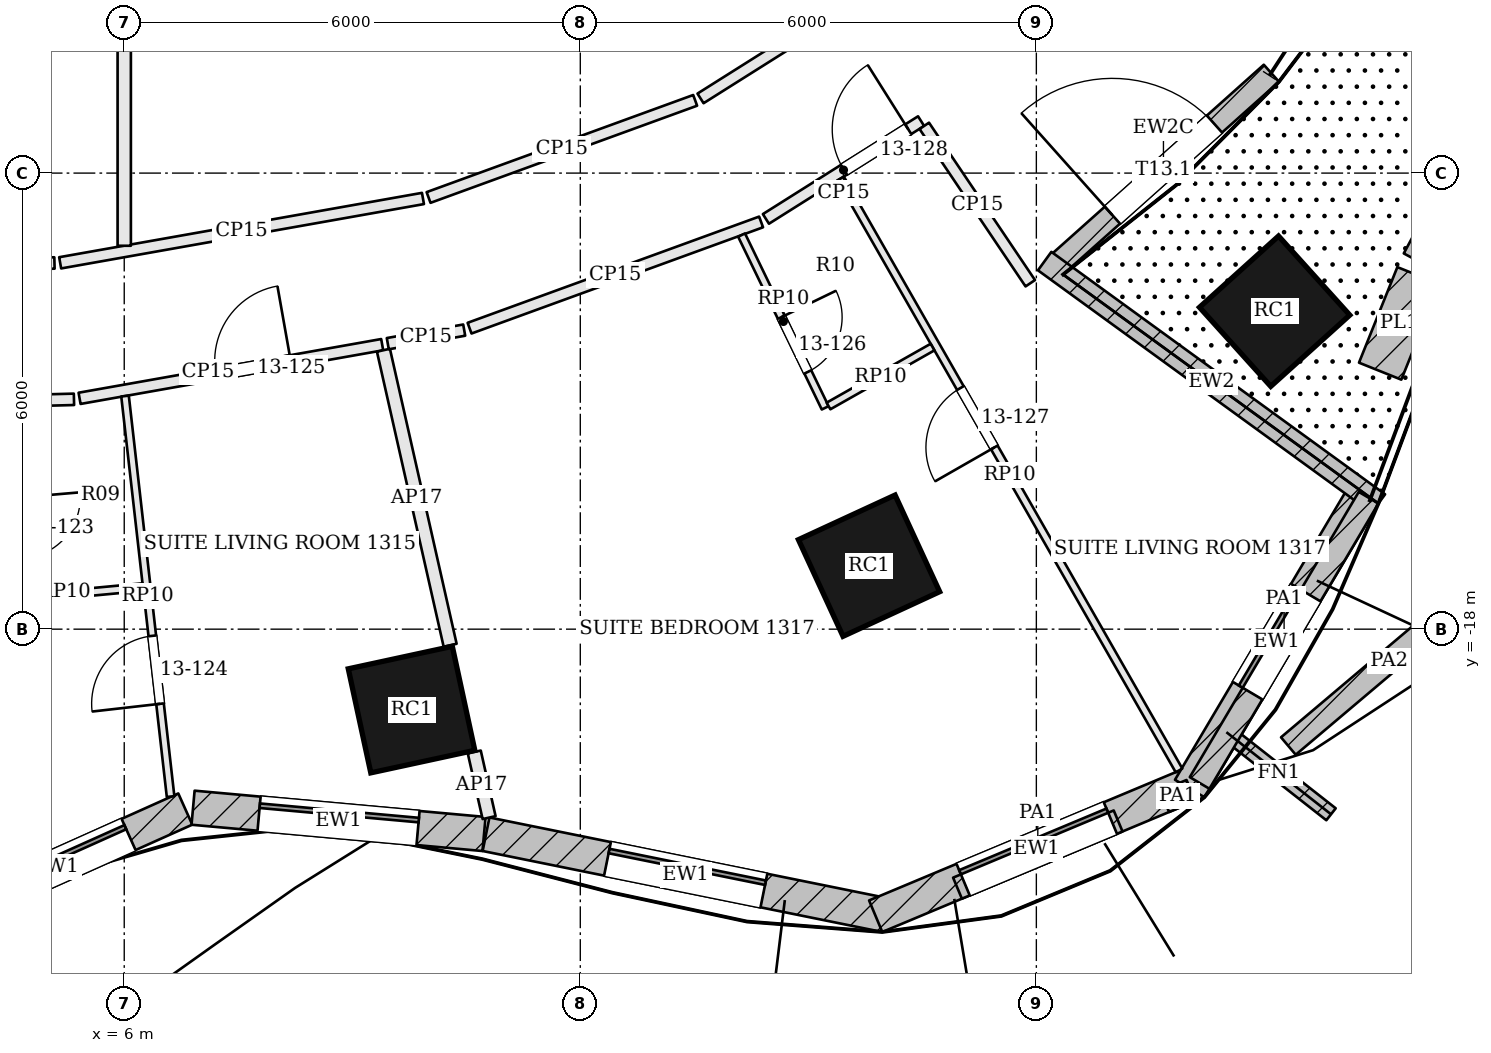
"""IFC4 building model, lengths in metres.
Left out: names, types, materials, properties, quantities, classifications, styles, units other than length and angle.
Written with IfcOpenShell. Run it as: python <this file> out.ifc"""

import sys

from ifc_helpers import new_model, si_unit, direction, frame, frame_2d, origin, origin_2d, place, context, subcontext, project, spatial, rectangle, extrude, element, fill, save


model = new_model("IFC4")
c1 = context("Model", 3, precision=1e-05, world=origin(), true_north=direction((0.0, 1.0)))
c2 = subcontext(c1, "Body", "Model", "MODEL_VIEW")
j1 = project(units=[si_unit("LENGTHUNIT", "METRE"), si_unit("PLANEANGLEUNIT", "RADIAN")], contexts=[c1])
p1 = place(None, origin())
s1 = spatial("IfcSite", under=j1, at=p1, CompositionType="ELEMENT")
p2 = place(p1, origin())
s2 = spatial("IfcBuilding", under=s1, at=p2, CompositionType="ELEMENT")
p3 = place(p2, frame((0.0, 0.0, 62.7)))
s3 = spatial("IfcBuildingStorey", under=s2, at=p3, CompositionType="ELEMENT", Elevation=62.7)
for number, where, z_axis, x_axis in (
    (1, (9.78, -19.058, 0.0), (0.0, 0.0, 1.0), (0.977, 0.211, 0.0)),
    (2, (15.799, -17.165, 0.0), (0.0, 0.0, 1.0), (0.908, 0.419, 0.0)),
    (3, (21.135, -13.817, 0.0), (0.0, 0.0, 1.0), (0.743, 0.67, 0.0)),
):
    element("IfcColumn", number, at=place(p3, frame(where, z_axis=z_axis, x_axis=x_axis)), inside=s3, PredefinedType="COLUMN", context=c2, shape_type="SweptSolid", body=[
        extrude(rectangle(XDim=1.4, YDim=1.4, at=origin_2d()), origin(), (0.0, 0.0, 1.0), 3.6),
    ])
p4 = place(p3, frame((3.395, -21.894, 0.0), z_axis=(0.0, 0.0, 1.0), x_axis=(0.912496703183, 0.409084058208, 0.0)))
e4 = element("IfcWall", 4, at=p4, inside=s3, PredefinedType="SOLIDWALL", context=c2, shape_type="SweptSolid", body=[
    extrude(rectangle(XDim=3.735, YDim=0.45, at=frame_2d((1.867, 0.0))), origin(), (0.0, 0.0, 1.0), 3.4),
])
p5 = place(p4, frame((0.817, 0.0, 0.9)))
e5 = element("IfcOpeningElement", 5, at=p5, cuts=e4, PredefinedType="OPENING", context=c2, shape_type="SweptSolid", body=[
    extrude(rectangle(XDim=2.1, YDim=2.0, at=frame_2d((1.05, 1.0))), frame((0.0, 0.235, 0.0), z_axis=(0.0, -1.0, 0.0), x_axis=(1.0, 0.0, 0.0)), (0.0, 0.0, 1.0), 0.47),
])
p6 = place(p3, frame((6.906, -20.349, 0.0), z_axis=(0.0, 0.0, 1.0), x_axis=(0.995947174038, -0.089940127451, 0.0)))
e6 = element("IfcWall", 6, at=p6, inside=s3, PredefinedType="SOLIDWALL", context=c2, shape_type="SweptSolid", body=[
    extrude(rectangle(XDim=3.844, YDim=0.45, at=frame_2d((1.922, 0.0))), origin(), (0.0, 0.0, 1.0), 3.4),
])
p7 = place(p6, frame((0.872, 0.0, 0.9)))
e7 = element("IfcOpeningElement", 7, at=p7, cuts=e6, PredefinedType="OPENING", context=c2, shape_type="SweptSolid", body=[
    extrude(rectangle(XDim=2.1, YDim=2.0, at=frame_2d((1.05, 1.0))), frame((0.0, 0.235, 0.0), z_axis=(0.0, -1.0, 0.0), x_axis=(1.0, 0.0, 0.0)), (0.0, 0.0, 1.0), 0.47),
])
p8 = place(p3, frame((10.76, -20.698, 0.0), z_axis=(0.0, 0.0, 1.0), x_axis=(0.980072890434, -0.198638187256, 0.0)))
e8 = element("IfcWall", 8, at=p8, inside=s3, PredefinedType="SOLIDWALL", context=c2, shape_type="SweptSolid", body=[
    extrude(rectangle(XDim=5.36, YDim=0.45, at=frame_2d((2.68, 0.0))), origin(), (0.0, 0.0, 1.0), 3.4),
])
p9 = place(p8, frame((1.63, 0.0, 0.9)))
e9 = element("IfcOpeningElement", 9, at=p9, cuts=e8, PredefinedType="OPENING", context=c2, shape_type="SweptSolid", body=[
    extrude(rectangle(XDim=2.1, YDim=2.0, at=frame_2d((1.05, 1.0))), frame((0.0, 0.235, 0.0), z_axis=(0.0, -1.0, 0.0), x_axis=(1.0, 0.0, 0.0)), (0.0, 0.0, 1.0), 0.47),
])
p10 = place(p3, frame((15.886, -21.776, 0.0), z_axis=(0.0, 0.0, 1.0), x_axis=(0.922527247898, 0.385931958882, 0.0)))
e10 = element("IfcWall", 10, at=p10, inside=s3, PredefinedType="SOLIDWALL", context=c2, shape_type="SweptSolid", body=[
    extrude(rectangle(XDim=4.594, YDim=0.45, at=frame_2d((2.297, 0.0))), origin(), (0.0, 0.0, 1.0), 3.4),
])
p11 = place(p10, frame((1.247, 0.0, 0.9)))
e11 = element("IfcOpeningElement", 11, at=p11, cuts=e10, PredefinedType="OPENING", context=c2, shape_type="SweptSolid", body=[
    extrude(rectangle(XDim=2.1, YDim=2.0, at=frame_2d((1.05, 1.0))), frame((0.0, 0.235, 0.0), z_axis=(0.0, -1.0, 0.0), x_axis=(1.0, 0.0, 0.0)), (0.0, 0.0, 1.0), 0.47),
])
p12 = place(p3, frame((20.017, -20.096, 0.0), z_axis=(0.0, 0.0, 1.0), x_axis=(0.509707017446, 0.860348043739, 0.0)))
e12 = element("IfcWall", 12, at=p12, inside=s3, PredefinedType="SOLIDWALL", context=c2, shape_type="SweptSolid", body=[
    extrude(rectangle(XDim=4.491, YDim=0.45, at=frame_2d((2.246, 0.0))), origin(), (0.0, 0.0, 1.0), 3.4),
])
p13 = place(p12, frame((1.496, 0.0, 0.9)))
e13 = element("IfcOpeningElement", 13, at=p13, cuts=e12, PredefinedType="OPENING", context=c2, shape_type="SweptSolid", body=[
    extrude(rectangle(XDim=1.5, YDim=2.0, at=frame_2d((0.75, 1.0))), frame((0.0, 0.235, 0.0), z_axis=(0.0, -1.0, 0.0), x_axis=(1.0, 0.0, 0.0)), (0.0, 0.0, 1.0), 0.47),
])
p14 = place(p3, frame((18.252, -13.222, 0.0), z_axis=(0.0, 0.0, 1.0), x_axis=(0.745864843194, 0.666097316979, 0.0)))
e14 = element("IfcWall", 14, at=p14, inside=s3, PredefinedType="SOLIDWALL", context=c2, shape_type="SweptSolid", body=[
    extrude(rectangle(XDim=3.807, YDim=0.3, at=frame_2d((1.904, 0.0))), origin(), (0.0, 0.0, 1.0), 2.804),
])
p15 = place(p14, frame((1.004, 0.0, 0.0)))
e15 = element("IfcOpeningElement", 15, at=p15, cuts=e14, PredefinedType="OPENING", context=c2, shape_type="SweptSolid", body=[
    extrude(rectangle(XDim=1.8, YDim=2.4, at=frame_2d((0.9, 1.2))), frame((0.0, 0.16, 0.0), z_axis=(0.0, -1.0, 0.0), x_axis=(1.0, 0.0, 0.0)), (0.0, 0.0, 1.0), 0.32),
])
p16 = place(p3, frame((20.5, -19.355, 0.0), z_axis=(0.0, 0.0, 1.0), x_axis=(0.786700632228, -0.617334686577, 0.0)))
e16 = element("IfcWall", 16, at=p16, inside=s3, PredefinedType="SOLIDWALL", context=c2, shape_type="SweptSolid", body=[
    extrude(rectangle(XDim=1.75, YDim=0.2, at=frame_2d((0.875, 0.0))), origin(), (0.0, 0.0, 1.0), 3.4),
])
p17 = place(p3, frame((22.5, -16.347, 0.0), z_axis=(0.0, 0.0, 1.0), x_axis=(-0.809084182594, 0.587692764526, 0.0)))
e17 = element("IfcWall", 17, at=p17, inside=s3, PredefinedType="SOLIDWALL", context=c2, shape_type="SweptSolid", body=[
    extrude(rectangle(XDim=5.427, YDim=0.3, at=frame_2d((2.713, 0.0))), origin(), (0.0, 0.0, 1.0), 2.954),
])
p18 = place(p3, frame((22.523, -14.606, 0.0), z_axis=(0.0, 0.0, 1.0), x_axis=(0.372540149329, 0.928016075905, 0.0)))
e18 = element("IfcWall", 18, at=p18, inside=s3, PredefinedType="SOLIDWALL", context=c2, shape_type="SweptSolid", body=[
    extrude(rectangle(XDim=1.354, YDim=0.6, at=frame_2d((0.677, 0.0))), origin(), (0.0, 0.0, 1.0), 0.6),
])
p19 = place(p3, frame((23.098, -13.199, 0.0), z_axis=(0.0, 0.0, 1.0), x_axis=(0.473381874387, 0.880857310239, 0.0)))
e19 = element("IfcWall", 19, at=p19, inside=s3, PredefinedType="SOLIDWALL", context=c2, shape_type="SweptSolid", body=[
    extrude(rectangle(XDim=1.237, YDim=0.6, at=frame_2d((0.619, 0.0))), origin(), (0.0, 0.0, 1.0), 0.6),
])
p20 = place(p3, frame((23.97, -17.294, 0.0), z_axis=(0.0, 0.0, 1.0), x_axis=(-0.763769796421, -0.645488728077, 0.0)))
e20 = element("IfcWall", 20, at=p20, inside=s3, PredefinedType="PARAPET", context=c2, shape_type="SweptSolid", body=[
    extrude(rectangle(XDim=3.476, YDim=0.3, at=frame_2d((1.738, 0.0))), origin(), (0.0, 0.0, 1.0), 1.1),
])
p21 = place(p3, frame((16.962, -21.407, 3.6), z_axis=(0.0, 0.0, 1.0), x_axis=(0.922533659014, 0.385916633467, 0.0)))
e21 = element("IfcWall", 21, at=p21, inside=s3, PredefinedType="PARAPET", context=c2, shape_type="SweptSolid", body=[
    extrude(rectangle(XDim=2.291, YDim=0.3, at=frame_2d((1.146, 0.0))), origin(), (0.0, 0.0, 1.0), 1.1),
])
p22 = place(p3, frame((19.688, -20.267, 3.6), z_axis=(0.0, 0.0, 1.0), x_axis=(0.922419372029, 0.386189722943, 0.0)))
e22 = element("IfcWall", 22, at=p22, inside=s3, PredefinedType="PARAPET", context=c2, shape_type="SweptSolid", body=[
    extrude(rectangle(XDim=0.374, YDim=0.3, at=frame_2d((0.187, 0.0))), origin(), (0.0, 0.0, 1.0), 1.1),
])
p23 = place(p3, frame((20.148, -20.023, 3.6), z_axis=(0.0, 0.0, 1.0), x_axis=(0.509647415189, 0.86038335188, 0.0)))
e23 = element("IfcWall", 23, at=p23, inside=s3, PredefinedType="PARAPET", context=c2, shape_type="SweptSolid", body=[
    extrude(rectangle(XDim=4.362, YDim=0.3, at=frame_2d((2.181, 0.0))), origin(), (0.0, 0.0, 1.0), 1.1),
])
p24 = place(p3, frame((-0.089, -15.117, 0.0), z_axis=(0.0, 0.0, 1.0), x_axis=(0.999662208654, 0.025989778545, 0.0)))
e24 = element("IfcWall", 24, at=p24, inside=s3, PredefinedType="PARTITIONING", context=c2, shape_type="SweptSolid", body=[
    extrude(rectangle(XDim=5.43, YDim=0.15, at=frame_2d((2.715, 0.0))), origin(), (0.0, 0.0, 1.0), 2.68),
])
p25 = place(p3, frame((5.413, -14.963, 0.0), z_axis=(0.0, 0.0, 1.0), x_axis=(0.984633650787, 0.17463268233, 0.0)))
e25 = element("IfcWall", 25, at=p25, inside=s3, PredefinedType="PARTITIONING", context=c2, shape_type="SweptSolid", body=[
    extrude(rectangle(XDim=4.043, YDim=0.15, at=frame_2d((2.021, 0.0))), origin(), (0.0, 0.0, 1.0), 2.68),
])
p26 = place(p25, frame((1.821, 0.0, 0.0)))
e26 = element("IfcOpeningElement", 26, at=p26, cuts=e25, PredefinedType="OPENING", context=c2, shape_type="SweptSolid", body=[
    extrude(rectangle(XDim=1.0, YDim=2.1, at=frame_2d((0.5, 1.05))), frame((0.0, 0.085, 0.0), z_axis=(0.0, -1.0, 0.0), x_axis=(1.0, 0.0, 0.0)), (0.0, 0.0, 1.0), 0.17),
])
p27 = place(p3, frame((10.8, -20.479, 0.0), z_axis=(0.0, 0.0, 1.0), x_axis=(-0.220523472725, 0.97538166785, 0.0)))
e27 = element("IfcWall", 27, at=p27, inside=s3, PredefinedType="PARTITIONING", context=c2, shape_type="SweptSolid", body=[
    extrude(rectangle(XDim=0.885, YDim=0.175, at=frame_2d((0.442, 0.0))), origin(), (0.0, 0.0, 1.0), 2.68),
])
p28 = place(p3, frame((10.288, -18.211, 0.0), z_axis=(0.0, 0.0, 1.0), x_axis=(-0.220515098372, 0.975383561164, 0.0)))
e28 = element("IfcWall", 28, at=p28, inside=s3, PredefinedType="PARTITIONING", context=c2, shape_type="SweptSolid", body=[
    extrude(rectangle(XDim=3.979, YDim=0.175, at=frame_2d((1.99, 0.0))), origin(), (0.0, 0.0, 1.0), 2.68),
])
p29 = place(p3, frame((9.467, -14.244, 0.0), z_axis=(0.0, 0.0, 1.0), x_axis=(0.98464846319, 0.174549144762, 0.0)))
e29 = element("IfcWall", 29, at=p29, inside=s3, PredefinedType="PARTITIONING", context=c2, shape_type="SweptSolid", body=[
    extrude(rectangle(XDim=1.021, YDim=0.15, at=frame_2d((0.51, 0.0))), origin(), (0.0, 0.0, 1.0), 2.68),
])
p30 = place(p3, frame((10.543, -14.04, 0.0), z_axis=(0.0, 0.0, 1.0), x_axis=(0.939576705301, 0.342338450741, 0.0)))
e30 = element("IfcWall", 30, at=p30, inside=s3, PredefinedType="PARTITIONING", context=c2, shape_type="SweptSolid", body=[
    extrude(rectangle(XDim=4.082, YDim=0.15, at=frame_2d((2.041, 0.0))), origin(), (0.0, 0.0, 1.0), 2.68),
])
p31 = place(p3, frame((14.442, -12.603, 0.0), z_axis=(0.0, 0.0, 1.0), x_axis=(0.846002986925, 0.533178156074, 0.0)))
e31 = element("IfcWall", 31, at=p31, inside=s3, PredefinedType="PARTITIONING", context=c2, shape_type="SweptSolid", body=[
    extrude(rectangle(XDim=2.413, YDim=0.15, at=frame_2d((1.207, 0.0))), origin(), (0.0, 0.0, 1.0), 2.68),
])
p32 = place(p31, frame((1.213, 0.0, 0.0)))
e32 = element("IfcOpeningElement", 32, at=p32, cuts=e31, PredefinedType="OPENING", context=c2, shape_type="SweptSolid", body=[
    extrude(rectangle(XDim=1.0, YDim=2.1, at=frame_2d((0.5, 1.05))), frame((0.0, 0.085, 0.0), z_axis=(0.0, -1.0, 0.0), x_axis=(1.0, 0.0, 0.0)), (0.0, 0.0, 1.0), 0.17),
])
p33 = place(p3, frame((17.92, -13.449, 0.0), z_axis=(0.0, 0.0, 1.0), x_axis=(-0.558575665577, 0.829453570627, 0.0)))
e33 = element("IfcWall", 33, at=p33, inside=s3, PredefinedType="PARTITIONING", context=c2, shape_type="SweptSolid", body=[
    extrude(rectangle(XDim=2.497, YDim=0.15, at=frame_2d((1.248, 0.0))), origin(), (0.0, 0.0, 1.0), 2.68),
])
p34 = place(p3, frame((16.517, -9.167, 0.0), z_axis=(0.0, 0.0, 1.0), x_axis=(-0.846000117603, -0.533182708849, 0.0)))
e34 = element("IfcWall", 34, at=p34, inside=s3, PredefinedType="PARTITIONING", context=c2, shape_type="SweptSolid", body=[
    extrude(rectangle(XDim=3.47, YDim=0.15, at=frame_2d((1.735, 0.0))), origin(), (0.0, 0.0, 1.0), 2.68),
])
p35 = place(p3, frame((13.511, -11.043, 0.0), z_axis=(0.0, 0.0, 1.0), x_axis=(-0.939583191704, -0.342320647736, 0.0)))
e35 = element("IfcWall", 35, at=p35, inside=s3, PredefinedType="PARTITIONING", context=c2, shape_type="SweptSolid", body=[
    extrude(rectangle(XDim=3.733, YDim=0.15, at=frame_2d((1.866, 0.0))), origin(), (0.0, 0.0, 1.0), 2.68),
])
p36 = place(p3, frame((9.93, -12.334, 0.0), z_axis=(0.0, 0.0, 1.0), x_axis=(-0.984638212434, -0.174606960386, 0.0)))
e36 = element("IfcWall", 36, at=p36, inside=s3, PredefinedType="PARTITIONING", context=c2, shape_type="SweptSolid", body=[
    extrude(rectangle(XDim=4.848, YDim=0.15, at=frame_2d((2.424, 0.0))), origin(), (0.0, 0.0, 1.0), 2.68),
])
p37 = place(p3, frame((5.082, -13.182, 0.0), z_axis=(0.0, 0.0, 1.0), x_axis=(-0.999661624383, -0.026012242045, 0.0)))
e37 = element("IfcWall", 37, at=p37, inside=s3, PredefinedType="PARTITIONING", context=c2, shape_type="SweptSolid", body=[
    extrude(rectangle(XDim=7.218, YDim=0.15, at=frame_2d((3.609, 0.0))), origin(), (0.0, 0.0, 1.0), 2.68),
])
p38 = place(p3, frame((6.61, -20.202, 0.0), z_axis=(0.0, 0.0, 1.0), x_axis=(-0.113018145239, 0.993592924113, 0.0)))
e38 = element("IfcWall", 38, at=p38, inside=s3, PredefinedType="PARTITIONING", context=c2, shape_type="SweptSolid", body=[
    extrude(rectangle(XDim=5.303, YDim=0.1, at=frame_2d((2.652, 0.0))), origin(), (0.0, 0.0, 1.0), 2.68),
])
p39 = place(p38, frame((1.228, 0.0, 0.0)))
e39 = element("IfcOpeningElement", 39, at=p39, cuts=e38, PredefinedType="OPENING", context=c2, shape_type="SweptSolid", body=[
    extrude(rectangle(XDim=0.9, YDim=2.4, at=frame_2d((0.45, 1.2))), frame((0.0, 0.06, 0.0), z_axis=(0.0, -1.0, 0.0), x_axis=(1.0, 0.0, 0.0)), (0.0, 0.0, 1.0), 0.12),
])
p40 = place(p3, frame((4.784, -17.583, 0.0), z_axis=(0.0, 0.0, 1.0), x_axis=(0.995655447425, 0.093114069899, 0.0)))
e40 = element("IfcWall", 40, at=p40, inside=s3, PredefinedType="PARTITIONING", context=c2, shape_type="SweptSolid", body=[
    extrude(rectangle(XDim=1.468, YDim=0.1, at=frame_2d((0.734, 0.0))), origin(), (0.0, 0.0, 1.0), 2.68),
])
p41 = place(p3, frame((19.877, -19.859, 0.0), z_axis=(0.0, 0.0, 1.0), x_axis=(-0.496434961101, 0.868073919316, 0.0)))
e41 = element("IfcWall", 41, at=p41, inside=s3, PredefinedType="PARTITIONING", context=c2, shape_type="SweptSolid", body=[
    extrude(rectangle(XDim=8.97, YDim=0.1, at=frame_2d((4.485, 0.0))), origin(), (0.0, 0.0, 1.0), 2.68),
])
p42 = place(p41, frame((4.895, 0.0, 0.0)))
e42 = element("IfcOpeningElement", 42, at=p42, cuts=e41, PredefinedType="OPENING", context=c2, shape_type="SweptSolid", body=[
    extrude(rectangle(XDim=0.9, YDim=2.4, at=frame_2d((0.45, 1.2))), frame((0.0, 0.06, 0.0), z_axis=(0.0, -1.0, 0.0), x_axis=(1.0, 0.0, 0.0)), (0.0, 0.0, 1.0), 0.12),
])
p43 = place(p3, frame((14.122, -12.816, 0.0), z_axis=(0.0, 0.0, 1.0), x_axis=(0.435611476295, -0.900134790862, 0.0)))
e43 = element("IfcWall", 43, at=p43, inside=s3, PredefinedType="PARTITIONING", context=c2, shape_type="SweptSolid", body=[
    extrude(rectangle(XDim=2.525, YDim=0.1, at=frame_2d((1.262, 0.0))), origin(), (0.0, 0.0, 1.0), 2.68),
])
p44 = place(p43, frame((1.2, 0.0, 0.0)))
e44 = element("IfcOpeningElement", 44, at=p44, cuts=e43, PredefinedType="OPENING", context=c2, shape_type="SweptSolid", body=[
    extrude(rectangle(XDim=0.8, YDim=2.1, at=frame_2d((0.4, 1.05))), frame((0.0, 0.06, 0.0), z_axis=(0.0, -1.0, 0.0), x_axis=(1.0, 0.0, 0.0)), (0.0, 0.0, 1.0), 0.12),
])
p45 = place(p3, frame((15.265, -15.064, 0.0), z_axis=(0.0, 0.0, 1.0), x_axis=(0.870241790153, 0.492624833591, 0.0)))
e45 = element("IfcWall", 45, at=p45, inside=s3, PredefinedType="PARTITIONING", context=c2, shape_type="SweptSolid", body=[
    extrude(rectangle(XDim=1.573, YDim=0.1, at=frame_2d((0.787, 0.0))), origin(), (0.0, 0.0, 1.0), 2.68),
])
p46 = place(p3, frame((6.0, -12.956, 0.0), z_axis=(0.0, 0.0, 1.0), x_axis=(0.0, 1.0, 0.0)))
e46 = element("IfcWall", 46, at=p46, inside=s3, PredefinedType="PARTITIONING", context=c2, shape_type="SweptSolid", body=[
    extrude(rectangle(XDim=8.081, YDim=0.175, at=frame_2d((4.041, 0.0))), origin(), (0.0, 0.0, 1.0), 2.68),
])
p47 = place(p5, origin())
e47 = element("IfcWindow", 47, at=p47, inside=s3, PartitioningType="SINGLE_PANEL", PredefinedType="WINDOW", context=c2, shape_type="SweptSolid", body=[
    extrude(rectangle(XDim=2.1, YDim=2.0, at=frame_2d((1.05, 1.0))), frame((0.0, 0.135, 0.0), z_axis=(0.0, -1.0, 0.0), x_axis=(1.0, 0.0, 0.0)), (0.0, 0.0, 1.0), 0.06),
])
fill(e5, e47)
p48 = place(p7, origin())
e48 = element("IfcWindow", 48, at=p48, inside=s3, PartitioningType="SINGLE_PANEL", PredefinedType="WINDOW", context=c2, shape_type="SweptSolid", body=[
    extrude(rectangle(XDim=2.1, YDim=2.0, at=frame_2d((1.05, 1.0))), frame((0.0, 0.135, 0.0), z_axis=(0.0, -1.0, 0.0), x_axis=(1.0, 0.0, 0.0)), (0.0, 0.0, 1.0), 0.06),
])
fill(e7, e48)
p49 = place(p9, origin())
e49 = element("IfcWindow", 49, at=p49, inside=s3, PartitioningType="SINGLE_PANEL", PredefinedType="WINDOW", context=c2, shape_type="SweptSolid", body=[
    extrude(rectangle(XDim=2.1, YDim=2.0, at=frame_2d((1.05, 1.0))), frame((0.0, 0.135, 0.0), z_axis=(0.0, -1.0, 0.0), x_axis=(1.0, 0.0, 0.0)), (0.0, 0.0, 1.0), 0.06),
])
fill(e9, e49)
p50 = place(p11, origin())
e50 = element("IfcWindow", 50, at=p50, inside=s3, PartitioningType="SINGLE_PANEL", PredefinedType="WINDOW", context=c2, shape_type="SweptSolid", body=[
    extrude(rectangle(XDim=2.1, YDim=2.0, at=frame_2d((1.05, 1.0))), frame((0.0, 0.135, 0.0), z_axis=(0.0, -1.0, 0.0), x_axis=(1.0, 0.0, 0.0)), (0.0, 0.0, 1.0), 0.06),
])
fill(e11, e50)
p51 = place(p13, origin())
e51 = element("IfcWindow", 51, at=p51, inside=s3, PartitioningType="SINGLE_PANEL", PredefinedType="WINDOW", context=c2, shape_type="SweptSolid", body=[
    extrude(rectangle(XDim=1.5, YDim=2.0, at=frame_2d((0.75, 1.0))), frame((0.0, 0.135, 0.0), z_axis=(0.0, -1.0, 0.0), x_axis=(1.0, 0.0, 0.0)), (0.0, 0.0, 1.0), 0.06),
])
fill(e13, e51)
p52 = place(p15, origin())
e52 = element("IfcDoor", 52, at=p52, inside=s3, OperationType="DOUBLE_DOOR_DOUBLE_SWING", PredefinedType="DOOR", context=c2, shape_type="SweptSolid", body=[
    extrude(rectangle(XDim=1.8, YDim=2.4, at=frame_2d((0.9, 1.2))), frame((0.0, 0.025, 0.0), z_axis=(0.0, -1.0, 0.0), x_axis=(1.0, 0.0, 0.0)), (0.0, 0.0, 1.0), 0.05),
])
fill(e15, e52)
p53 = place(p39, origin())
e53 = element("IfcDoor", 53, at=p53, inside=s3, OperationType="SINGLE_SWING_LEFT", PredefinedType="DOOR", context=c2, shape_type="SweptSolid", body=[
    extrude(rectangle(XDim=0.9, YDim=2.4, at=frame_2d((0.45, 1.2))), frame((0.0, 0.025, 0.0), z_axis=(0.0, -1.0, 0.0), x_axis=(1.0, 0.0, 0.0)), (0.0, 0.0, 1.0), 0.05),
])
fill(e39, e53)
p54 = place(p26, origin())
e54 = element("IfcDoor", 54, at=p54, inside=s3, OperationType="SINGLE_SWING_RIGHT", PredefinedType="DOOR", context=c2, shape_type="SweptSolid", body=[
    extrude(rectangle(XDim=1.0, YDim=2.1, at=frame_2d((0.5, 1.05))), frame((0.0, 0.025, 0.0), z_axis=(0.0, -1.0, 0.0), x_axis=(1.0, 0.0, 0.0)), (0.0, 0.0, 1.0), 0.05),
])
fill(e26, e54)
p55 = place(p44, origin())
e55 = element("IfcDoor", 55, at=p55, inside=s3, OperationType="SINGLE_SWING_LEFT", PredefinedType="DOOR", context=c2, shape_type="SweptSolid", body=[
    extrude(rectangle(XDim=0.8, YDim=2.1, at=frame_2d((0.4, 1.05))), frame((0.0, 0.025, 0.0), z_axis=(0.0, -1.0, 0.0), x_axis=(1.0, 0.0, 0.0)), (0.0, 0.0, 1.0), 0.05),
])
fill(e44, e55)
p56 = place(p42, origin())
e56 = element("IfcDoor", 56, at=p56, inside=s3, OperationType="SINGLE_SWING_LEFT", PredefinedType="DOOR", context=c2, shape_type="SweptSolid", body=[
    extrude(rectangle(XDim=0.9, YDim=2.4, at=frame_2d((0.45, 1.2))), frame((0.0, 0.025, 0.0), z_axis=(0.0, -1.0, 0.0), x_axis=(1.0, 0.0, 0.0)), (0.0, 0.0, 1.0), 0.05),
])
fill(e42, e56)
p57 = place(p32, origin())
e57 = element("IfcDoor", 57, at=p57, inside=s3, OperationType="SINGLE_SWING_RIGHT", PredefinedType="DOOR", context=c2, shape_type="SweptSolid", body=[
    extrude(rectangle(XDim=1.0, YDim=2.1, at=frame_2d((0.5, 1.05))), frame((0.0, 0.025, 0.0), z_axis=(0.0, -1.0, 0.0), x_axis=(1.0, 0.0, 0.0)), (0.0, 0.0, 1.0), 0.05),
])
fill(e32, e57)
save(model, sys.argv[1])
